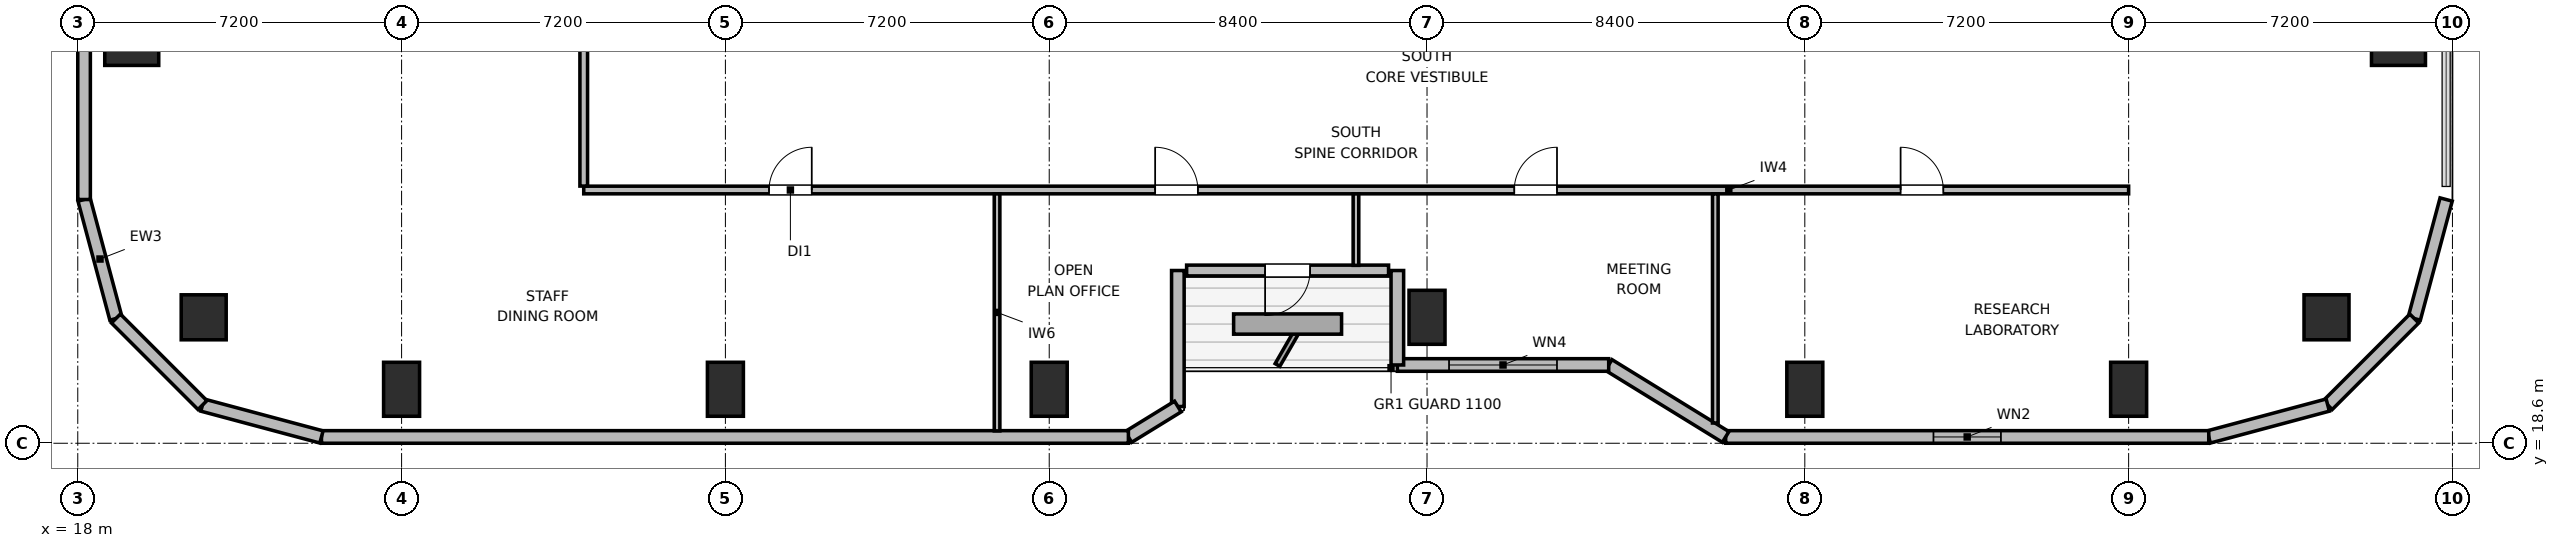
"""IFC4 building model, lengths in metres.
Left out: names, types, materials, properties, quantities, classifications, styles, units other than length and angle.
Written with IfcOpenShell. Run it as: python <this file> out.ifc"""

import sys

from ifc_helpers import new_model, si_unit, direction, frame, frame_2d, origin, origin_2d, place, context, subcontext, project, spatial, rectangle, circle, extrude, element, fill, save


model = new_model("IFC4")
c1 = context("Model", 3, precision=1e-05, world=origin(), true_north=direction((0.0, 1.0)))
c2 = subcontext(c1, "Body", "Model", "MODEL_VIEW")
j1 = project(units=[si_unit("LENGTHUNIT", "METRE"), si_unit("PLANEANGLEUNIT", "RADIAN")], contexts=[c1])
p1 = place(None, origin())
s1 = spatial("IfcSite", under=j1, at=p1, CompositionType="ELEMENT")
p2 = place(p1, origin())
s2 = spatial("IfcBuilding", under=s1, at=p2, CompositionType="ELEMENT")
p3 = place(p2, frame((0.0, 0.0, 190.2)))
s3 = spatial("IfcBuildingStorey", under=s2, at=p3, CompositionType="ELEMENT", Elevation=190.2)
for number, where, z_axis, x_axis in (
    (1, (20.8, 21.4, 0.0), (0.0, 0.0, 1.0), (1.0, 0.0, 0.0)),
    (2, (68.0, 21.4, 0.0), (0.0, 0.0, 1.0), (1.0, 0.0, 0.0)),
):
    element("IfcColumn", number, at=place(p3, frame(where, z_axis=z_axis, x_axis=x_axis)), inside=s3, PredefinedType="COLUMN", context=c2, shape_type="SweptSolid", body=[
        extrude(circle(Radius=0.5, at=origin_2d()), origin(), (0.0, 0.0, 1.0), 3.9),
    ])
for number, where, z_axis, x_axis in (
    (3, (25.2, 19.8, 0.0), (0.0, 0.0, 1.0), (1.0, 0.0, 0.0)),
    (4, (32.4, 19.8, 0.0), (0.0, 0.0, 1.0), (1.0, 0.0, 0.0)),
    (5, (39.6, 19.8, 0.0), (0.0, 0.0, 1.0), (1.0, 0.0, 0.0)),
    (6, (48.0, 21.4, 0.0), (0.0, 0.0, 1.0), (1.0, 0.0, 0.0)),
    (7, (56.4, 19.8, 0.0), (0.0, 0.0, 1.0), (1.0, 0.0, 0.0)),
    (8, (63.6, 19.8, 0.0), (0.0, 0.0, 1.0), (1.0, 0.0, 0.0)),
):
    element("IfcColumn", number, at=place(p3, frame(where, z_axis=z_axis, x_axis=x_axis)), inside=s3, PredefinedType="COLUMN", context=c2, shape_type="SweptSolid", body=[
        extrude(rectangle(XDim=0.8, YDim=1.2, at=origin_2d()), origin(), (0.0, 0.0, 1.0), 3.9),
    ])
for number, where, z_axis, x_axis in (
    (9, (19.2, 27.6, 0.0), (0.0, 0.0, 1.0), (1.0, 0.0, 0.0)),
    (10, (69.6, 27.6, 0.0), (0.0, 0.0, 1.0), (1.0, 0.0, 0.0)),
):
    element("IfcColumn", number, at=place(p3, frame(where, z_axis=z_axis, x_axis=x_axis)), inside=s3, PredefinedType="COLUMN", context=c2, shape_type="SweptSolid", body=[
        extrude(rectangle(XDim=1.2, YDim=1.2, at=origin_2d()), origin(), (0.0, 0.0, 1.0), 3.9),
    ])
p4 = place(p3, frame((18.848, 21.373, 0.0), z_axis=(0.0, 0.0, 1.0), x_axis=(-0.258672222976, 0.9659651552, 0.0)))
e11 = element("IfcWall", 11, at=p4, inside=s3, PredefinedType="SOLIDWALL", context=c2, shape_type="SweptSolid", body=[
    extrude(rectangle(XDim=2.739, YDim=0.28, at=frame_2d((1.37, 0.0))), origin(), (0.0, 0.0, 1.0), 3.68),
])
p5 = place(p3, frame((18.14, 24.018, 0.0), z_axis=(0.0, 0.0, 1.0), x_axis=(0.0, 1.0, 0.0)))
e12 = element("IfcWall", 12, at=p5, inside=s3, PredefinedType="SOLIDWALL", context=c2, shape_type="SweptSolid", body=[
    extrude(rectangle(XDim=5.242, YDim=0.28, at=frame_2d((2.621, 0.0))), origin(), (0.0, 0.0, 1.0), 3.68),
])
p6 = place(p3, frame((70.66, 24.018, 0.0), z_axis=(0.0, 0.0, 1.0), x_axis=(-0.258672222976, -0.9659651552, 0.0)))
e13 = element("IfcWall", 13, at=p6, inside=s3, PredefinedType="SOLIDWALL", context=c2, shape_type="SweptSolid", body=[
    extrude(rectangle(XDim=2.739, YDim=0.28, at=frame_2d((1.37, 0.0))), origin(), (0.0, 0.0, 1.0), 3.68),
])
p7 = place(p3, frame((69.951, 21.373, 0.0), z_axis=(0.0, 0.0, 1.0), x_axis=(-0.707061915429, -0.707151644098, 0.0)))
e14 = element("IfcWall", 14, at=p7, inside=s3, PredefinedType="SOLIDWALL", context=c2, shape_type="SweptSolid", body=[
    extrude(rectangle(XDim=2.721, YDim=0.28, at=frame_2d((1.36, 0.0))), origin(), (0.0, 0.0, 1.0), 3.68),
])
p8 = place(p3, frame((68.028, 19.448, 0.0), z_axis=(0.0, 0.0, 1.0), x_axis=(-0.965971118627, -0.258649952598, 0.0)))
e15 = element("IfcWall", 15, at=p8, inside=s3, PredefinedType="SOLIDWALL", context=c2, shape_type="SweptSolid", body=[
    extrude(rectangle(XDim=2.739, YDim=0.28, at=frame_2d((1.37, 0.0))), origin(), (0.0, 0.0, 1.0), 3.68),
])
p9 = place(p3, frame((65.382, 18.74, 0.0), z_axis=(0.0, 0.0, 1.0), x_axis=(-1.0, 0.0, 0.0)))
e16 = element("IfcWall", 16, at=p9, inside=s3, PredefinedType="SOLIDWALL", context=c2, shape_type="SweptSolid", body=[
    extrude(rectangle(XDim=10.742, YDim=0.28, at=frame_2d((5.371, 0.0))), origin(), (0.0, 0.0, 1.0), 3.68),
])
p10 = place(p9, frame((4.621, 0.0, 0.85)))
e17 = element("IfcOpeningElement", 17, at=p10, cuts=e16, PredefinedType="OPENING", context=c2, shape_type="SweptSolid", body=[
    extrude(rectangle(XDim=1.5, YDim=1.1, at=frame_2d((0.75, 0.55))), frame((0.0, 0.15, 0.0), z_axis=(0.0, -1.0, 0.0), x_axis=(1.0, 0.0, 0.0)), (0.0, 0.0, 1.0), 0.3),
])
p11 = place(p3, frame((54.64, 18.74, 0.0), z_axis=(0.0, 0.0, 1.0), x_axis=(-0.851652825334, 0.524106349037, 0.0)))
e18 = element("IfcWall", 18, at=p11, inside=s3, PredefinedType="SOLIDWALL", context=c2, shape_type="SweptSolid", body=[
    extrude(rectangle(XDim=3.053, YDim=0.28, at=frame_2d((1.526, 0.0))), origin(), (0.0, 0.0, 1.0), 2.265),
])
p12 = place(p3, frame((52.04, 20.34, 0.0), z_axis=(0.0, 0.0, 1.0), x_axis=(-1.0, 0.0, 0.0)))
e19 = element("IfcWall", 19, at=p12, inside=s3, PredefinedType="SOLIDWALL", context=c2, shape_type="SweptSolid", body=[
    extrude(rectangle(XDim=4.699, YDim=0.28, at=frame_2d((2.35, 0.0))), origin(), (0.0, 0.0, 1.0), 2.265),
])
p13 = place(p12, frame((1.15, 0.0, 0.85)))
e20 = element("IfcOpeningElement", 20, at=p13, cuts=e19, PredefinedType="OPENING", context=c2, shape_type="SweptSolid", body=[
    extrude(rectangle(XDim=2.4, YDim=1.15, at=frame_2d((1.2, 0.575))), frame((0.0, 0.15, 0.0), z_axis=(0.0, -1.0, 0.0), x_axis=(1.0, 0.0, 0.0)), (0.0, 0.0, 1.0), 0.3),
])
p14 = place(p3, frame((47.34, 20.34, 0.0), z_axis=(0.0, 0.0, 1.0), x_axis=(0.0, 1.0, 0.0)))
e21 = element("IfcWall", 21, at=p14, inside=s3, PredefinedType="SOLIDWALL", context=c2, shape_type="SweptSolid", body=[
    extrude(rectangle(XDim=2.1, YDim=0.28, at=frame_2d((1.05, 0.0))), origin(), (0.0, 0.0, 1.0), 2.265),
])
p15 = place(p3, frame((47.145, 22.44, 0.0), z_axis=(0.0, 0.0, 1.0), x_axis=(-1.0, 0.0, 0.0)))
e22 = element("IfcWall", 22, at=p15, inside=s3, PredefinedType="SOLIDWALL", context=c2, shape_type="SweptSolid", body=[
    extrude(rectangle(XDim=4.49, YDim=0.24, at=frame_2d((2.245, 0.0))), origin(), (0.0, 0.0, 1.0), 3.68),
])
p16 = place(p15, frame((1.745, 0.0, 0.0)))
e23 = element("IfcOpeningElement", 23, at=p16, cuts=e22, PredefinedType="OPENING", context=c2, shape_type="SweptSolid", body=[
    extrude(rectangle(XDim=1.0, YDim=2.02, at=frame_2d((0.5, 1.01))), frame((0.0, 0.13, 0.0), z_axis=(0.0, -1.0, 0.0), x_axis=(1.0, 0.0, 0.0)), (0.0, 0.0, 1.0), 0.26),
])
p17 = place(p3, frame((42.46, 22.44, 0.0), z_axis=(0.0, 0.0, 1.0), x_axis=(0.0, -1.0, 0.0)))
e24 = element("IfcWall", 24, at=p17, inside=s3, PredefinedType="SOLIDWALL", context=c2, shape_type="SweptSolid", body=[
    extrude(rectangle(XDim=3.024, YDim=0.28, at=frame_2d((1.512, 0.0))), origin(), (0.0, 0.0, 1.0), 2.265),
])
p18 = place(p3, frame((42.46, 19.416, 0.0), z_axis=(0.0, 0.0, 1.0), x_axis=(-0.851801140441, -0.523865266212, 0.0)))
e25 = element("IfcWall", 25, at=p18, inside=s3, PredefinedType="SOLIDWALL", context=c2, shape_type="SweptSolid", body=[
    extrude(rectangle(XDim=1.291, YDim=0.28, at=frame_2d((0.646, 0.0))), origin(), (0.0, 0.0, 1.0), 3.68),
])
p19 = place(p3, frame((41.36, 18.74, 0.0), z_axis=(0.0, 0.0, 1.0), x_axis=(-1.0, 0.0, 0.0)))
e26 = element("IfcWall", 26, at=p19, inside=s3, PredefinedType="SOLIDWALL", context=c2, shape_type="SweptSolid", body=[
    extrude(rectangle(XDim=17.942, YDim=0.28, at=frame_2d((8.971, 0.0))), origin(), (0.0, 0.0, 1.0), 3.68),
])
p20 = place(p3, frame((23.418, 18.74, 0.0), z_axis=(0.0, 0.0, 1.0), x_axis=(-0.965971118627, 0.258649952598, 0.0)))
e27 = element("IfcWall", 27, at=p20, inside=s3, PredefinedType="SOLIDWALL", context=c2, shape_type="SweptSolid", body=[
    extrude(rectangle(XDim=2.739, YDim=0.28, at=frame_2d((1.37, 0.0))), origin(), (0.0, 0.0, 1.0), 3.68),
])
p21 = place(p3, frame((20.772, 19.448, 0.0), z_axis=(0.0, 0.0, 1.0), x_axis=(-0.707106781187, 0.707106781187, 0.0)))
e28 = element("IfcWall", 28, at=p21, inside=s3, PredefinedType="SOLIDWALL", context=c2, shape_type="SweptSolid", body=[
    extrude(rectangle(XDim=2.721, YDim=0.28, at=frame_2d((1.36, 0.0))), origin(), (0.0, 0.0, 1.0), 3.68),
])
p22 = place(p3, frame((29.25, 24.23, 0.0), z_axis=(0.0, 0.0, 1.0), x_axis=(1.0, 0.0, 0.0)))
e29 = element("IfcWall", 29, at=p22, inside=s3, PredefinedType="PARTITIONING", context=c2, shape_type="SweptSolid", body=[
    extrude(rectangle(XDim=34.35, YDim=0.17, at=frame_2d((17.175, 0.0))), origin(), (0.0, 0.0, 1.0), 3.68),
])
p23 = place(p22, frame((4.12, 0.0, 0.0)))
e30 = element("IfcOpeningElement", 30, at=p23, cuts=e29, PredefinedType="OPENING", context=c2, shape_type="SweptSolid", body=[
    extrude(rectangle(XDim=0.95, YDim=2.04, at=frame_2d((0.475, 1.02))), frame((0.0, 0.095, 0.0), z_axis=(0.0, -1.0, 0.0), x_axis=(1.0, 0.0, 0.0)), (0.0, 0.0, 1.0), 0.19),
])
p24 = place(p22, frame((12.705, 0.0, 0.0)))
e31 = element("IfcOpeningElement", 31, at=p24, cuts=e29, PredefinedType="OPENING", context=c2, shape_type="SweptSolid", body=[
    extrude(rectangle(XDim=0.95, YDim=2.04, at=frame_2d((0.475, 1.02))), frame((0.0, 0.095, 0.0), z_axis=(0.0, -1.0, 0.0), x_axis=(1.0, 0.0, 0.0)), (0.0, 0.0, 1.0), 0.19),
])
p25 = place(p22, frame((20.69, 0.0, 0.0)))
e32 = element("IfcOpeningElement", 32, at=p25, cuts=e29, PredefinedType="OPENING", context=c2, shape_type="SweptSolid", body=[
    extrude(rectangle(XDim=0.95, YDim=2.04, at=frame_2d((0.475, 1.02))), frame((0.0, 0.095, 0.0), z_axis=(0.0, -1.0, 0.0), x_axis=(1.0, 0.0, 0.0)), (0.0, 0.0, 1.0), 0.19),
])
p26 = place(p22, frame((29.28, 0.0, 0.0)))
e33 = element("IfcOpeningElement", 33, at=p26, cuts=e29, PredefinedType="OPENING", context=c2, shape_type="SweptSolid", body=[
    extrude(rectangle(XDim=0.95, YDim=2.04, at=frame_2d((0.475, 1.02))), frame((0.0, 0.095, 0.0), z_axis=(0.0, -1.0, 0.0), x_axis=(1.0, 0.0, 0.0)), (0.0, 0.0, 1.0), 0.19),
])
p27 = place(p3, frame((29.25, 24.317, 0.0), z_axis=(0.0, 0.0, 1.0), x_axis=(0.0, 1.0, 0.0)))
e34 = element("IfcWall", 34, at=p27, inside=s3, PredefinedType="PARTITIONING", context=c2, shape_type="SweptSolid", body=[
    extrude(rectangle(XDim=10.083, YDim=0.17, at=frame_2d((5.042, 0.0))), origin(), (0.0, 0.0, 1.0), 3.68),
])
p28 = place(p27, frame((4.523, 0.0, 0.0)))
e35 = element("IfcOpeningElement", 35, at=p28, cuts=e34, PredefinedType="OPENING", context=c2, shape_type="SweptSolid", body=[
    extrude(rectangle(XDim=0.95, YDim=2.04, at=frame_2d((0.475, 1.02))), frame((0.0, 0.095, 0.0), z_axis=(0.0, -1.0, 0.0), x_axis=(1.0, 0.0, 0.0)), (0.0, 0.0, 1.0), 0.19),
])
p29 = place(p3, frame((38.44, 18.875, 0.0), z_axis=(0.0, 0.0, 1.0), x_axis=(0.0, 1.0, 0.0)))
e36 = element("IfcWall", 36, at=p29, inside=s3, PredefinedType="PARTITIONING", context=c2, shape_type="SweptSolid", body=[
    extrude(rectangle(XDim=5.268, YDim=0.125, at=frame_2d((2.634, 0.0))), origin(), (0.0, 0.0, 1.0), 3.68),
])
p30 = place(p3, frame((46.42, 22.555, 0.0), z_axis=(0.0, 0.0, 1.0), x_axis=(0.0, 1.0, 0.0)))
e37 = element("IfcWall", 37, at=p30, inside=s3, PredefinedType="PARTITIONING", context=c2, shape_type="SweptSolid", body=[
    extrude(rectangle(XDim=1.588, YDim=0.125, at=frame_2d((0.794, 0.0))), origin(), (0.0, 0.0, 1.0), 3.68),
])
p31 = place(p3, frame((54.41, 19.05, 0.0), z_axis=(0.0, 0.0, 1.0), x_axis=(0.0, 1.0, 0.0)))
e38 = element("IfcWall", 38, at=p31, inside=s3, PredefinedType="PARTITIONING", context=c2, shape_type="SweptSolid", body=[
    extrude(rectangle(XDim=5.093, YDim=0.125, at=frame_2d((2.546, 0.0))), origin(), (0.0, 0.0, 1.0), 3.043),
])
p32 = place(p10, origin())
e39 = element("IfcWindow", 39, at=p32, inside=s3, PartitioningType="SINGLE_PANEL", PredefinedType="WINDOW", context=c2, shape_type="SweptSolid", body=[
    extrude(rectangle(XDim=1.5, YDim=1.1, at=frame_2d((0.75, 0.55))), frame((0.0, 0.03, 0.0), z_axis=(0.0, -1.0, 0.0), x_axis=(1.0, 0.0, 0.0)), (0.0, 0.0, 1.0), 0.06),
])
fill(e17, e39)
p33 = place(p13, origin())
e40 = element("IfcWindow", 40, at=p33, inside=s3, PartitioningType="SINGLE_PANEL", PredefinedType="WINDOW", context=c2, shape_type="SweptSolid", body=[
    extrude(rectangle(XDim=2.4, YDim=1.15, at=frame_2d((1.2, 0.575))), frame((0.0, 0.03, 0.0), z_axis=(0.0, -1.0, 0.0), x_axis=(1.0, 0.0, 0.0)), (0.0, 0.0, 1.0), 0.06),
])
fill(e20, e40)
p34 = place(p16, origin())
e41 = element("IfcDoor", 41, at=p34, inside=s3, OperationType="SINGLE_SWING_RIGHT", PredefinedType="DOOR", context=c2, shape_type="SweptSolid", body=[
    extrude(rectangle(XDim=1.0, YDim=2.02, at=frame_2d((0.5, 1.01))), frame((0.0, 0.025, 0.0), z_axis=(0.0, -1.0, 0.0), x_axis=(1.0, 0.0, 0.0)), (0.0, 0.0, 1.0), 0.05),
])
fill(e23, e41)
p35 = place(p23, origin())
e42 = element("IfcDoor", 42, at=p35, inside=s3, OperationType="SINGLE_SWING_RIGHT", PredefinedType="DOOR", context=c2, shape_type="SweptSolid", body=[
    extrude(rectangle(XDim=0.95, YDim=2.04, at=frame_2d((0.475, 1.02))), frame((0.0, 0.025, 0.0), z_axis=(0.0, -1.0, 0.0), x_axis=(1.0, 0.0, 0.0)), (0.0, 0.0, 1.0), 0.05),
])
fill(e30, e42)
p36 = place(p24, origin())
e43 = element("IfcDoor", 43, at=p36, inside=s3, OperationType="SINGLE_SWING_LEFT", PredefinedType="DOOR", context=c2, shape_type="SweptSolid", body=[
    extrude(rectangle(XDim=0.95, YDim=2.04, at=frame_2d((0.475, 1.02))), frame((0.0, 0.025, 0.0), z_axis=(0.0, -1.0, 0.0), x_axis=(1.0, 0.0, 0.0)), (0.0, 0.0, 1.0), 0.05),
])
fill(e31, e43)
p37 = place(p25, origin())
e44 = element("IfcDoor", 44, at=p37, inside=s3, OperationType="SINGLE_SWING_RIGHT", PredefinedType="DOOR", context=c2, shape_type="SweptSolid", body=[
    extrude(rectangle(XDim=0.95, YDim=2.04, at=frame_2d((0.475, 1.02))), frame((0.0, 0.025, 0.0), z_axis=(0.0, -1.0, 0.0), x_axis=(1.0, 0.0, 0.0)), (0.0, 0.0, 1.0), 0.05),
])
fill(e32, e44)
p38 = place(p26, origin())
e45 = element("IfcDoor", 45, at=p38, inside=s3, OperationType="SINGLE_SWING_LEFT", PredefinedType="DOOR", context=c2, shape_type="SweptSolid", body=[
    extrude(rectangle(XDim=0.95, YDim=2.04, at=frame_2d((0.475, 1.02))), frame((0.0, 0.025, 0.0), z_axis=(0.0, -1.0, 0.0), x_axis=(1.0, 0.0, 0.0)), (0.0, 0.0, 1.0), 0.05),
])
fill(e33, e45)
save(model, sys.argv[1])
